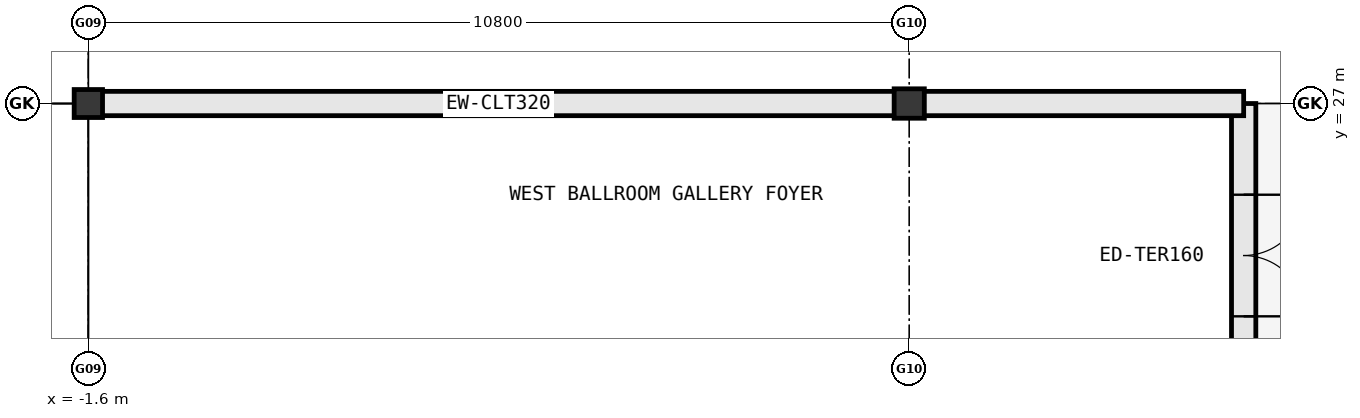
"""IFC4 building model, lengths in metres.
Left out: names, types, materials, properties, quantities, classifications, styles, units other than length and angle.
Written with IfcOpenShell. Run it as: python <this file> out.ifc"""

import sys

from ifc_helpers import new_model, si_unit, direction, frame, frame_2d, origin, origin_2d, place, context, subcontext, project, spatial, rectangle, i_section, extrude, element, fill, save


model = new_model("IFC4")
c1 = context("Model", 3, precision=1e-05, world=origin(), true_north=direction((0.0, 1.0)))
c2 = subcontext(c1, "Body", "Model", "MODEL_VIEW")
j1 = project(units=[si_unit("LENGTHUNIT", "METRE"), si_unit("PLANEANGLEUNIT", "RADIAN")], contexts=[c1])
p1 = place(None, origin())
s1 = spatial("IfcSite", under=j1, at=p1, CompositionType="ELEMENT")
p2 = place(p1, origin())
s2 = spatial("IfcBuilding", under=s1, at=p2, CompositionType="ELEMENT")
p3 = place(p2, frame((0.0, 0.0, 10.8)))
s3 = spatial("IfcBuildingStorey", under=s2, at=p3, CompositionType="ELEMENT", Elevation=10.8)
p4 = place(p3, frame((-1.6, 27.0, 0.0), z_axis=(0.0, 0.0, 1.0), x_axis=(1.0, 0.0, 0.0)))
e1 = element("IfcColumn", 1, at=p4, inside=s3, PredefinedType="COLUMN", context=c2, shape_type="SweptSolid", body=[
    extrude(i_section(OverallWidth=0.373, OverallDepth=0.368, WebThickness=0.015, FlangeThickness=0.024, at=origin_2d()), origin(), (0.0, 0.0, 1.0), 5.4),
])
p5 = place(p3, frame((9.2, 27.0, 0.0), z_axis=(0.0, 0.0, 1.0), x_axis=(1.0, 0.0, 0.0)))
e2 = element("IfcColumn", 2, at=p5, inside=s3, PredefinedType="COLUMN", context=c2, shape_type="SweptSolid", body=[
    extrude(i_section(OverallWidth=0.397, OverallDepth=0.387, WebThickness=0.021, FlangeThickness=0.033, at=origin_2d()), origin(), (0.0, 0.0, 1.0), 5.4),
])
p6 = place(p3, frame((13.6, 17.4, 0.0), z_axis=(0.0, 0.0, 1.0), x_axis=(0.0, 1.0, 0.0)))
e3 = element("IfcWall", 3, at=p6, inside=s3, PredefinedType="STANDARD", context=c2, shape_type="SweptSolid", body=[
    extrude(rectangle(XDim=9.6, YDim=0.32, at=frame_2d((4.8, 0.0))), origin(), (0.0, 0.0, 1.0), 4.8),
])
p7 = place(p6, frame((6.8, 0.0, 0.0)))
e4 = element("IfcOpeningElement", 4, at=p7, cuts=e3, PredefinedType="OPENING", context=c2, shape_type="SweptSolid", body=[
    extrude(rectangle(XDim=1.6, YDim=2.25, at=frame_2d((0.8, 1.125))), frame((0.0, 0.172, 0.0), z_axis=(0.0, -1.0, 0.0), x_axis=(1.0, 0.0, 0.0)), (0.0, 0.0, 1.0), 0.344),
])
p8 = place(p3, frame((13.6, 27.0, 0.0), z_axis=(0.0, 0.0, 1.0), x_axis=(-1.0, 0.0, 0.0)))
e5 = element("IfcWall", 5, at=p8, inside=s3, PredefinedType="STANDARD", context=c2, shape_type="SweptSolid", body=[
    extrude(rectangle(XDim=4.392, YDim=0.32, at=frame_2d((2.196, 0.0))), origin(), (0.0, 0.0, 1.0), 4.016),
])
p9 = place(p3, frame((9.191, 27.0, 0.0), z_axis=(0.0, 0.0, 1.0), x_axis=(-1.0, 0.0, 0.0)))
e6 = element("IfcWall", 6, at=p9, inside=s3, PredefinedType="STANDARD", context=c2, shape_type="SweptSolid", body=[
    extrude(rectangle(XDim=10.786, YDim=0.32, at=frame_2d((5.393, 0.0))), origin(), (0.0, 0.0, 1.0), 4.016),
])
p10 = place(p7, frame((1.6, 0.0, 0.0), z_axis=(0.0, 0.0, 1.0), x_axis=(-1.0, 0.0, 0.0)))
e7 = element("IfcDoor", 7, at=p10, inside=s3, OperationType="DOUBLE_DOOR_SINGLE_SWING", PredefinedType="DOOR", context=c2, shape_type="SweptSolid", body=[
    extrude(rectangle(XDim=1.6, YDim=2.25, at=frame_2d((0.8, 1.125))), frame((0.0, 0.025, 0.0), z_axis=(0.0, -1.0, 0.0), x_axis=(1.0, 0.0, 0.0)), (0.0, 0.0, 1.0), 0.05),
])
fill(e4, e7)
save(model, sys.argv[1])
